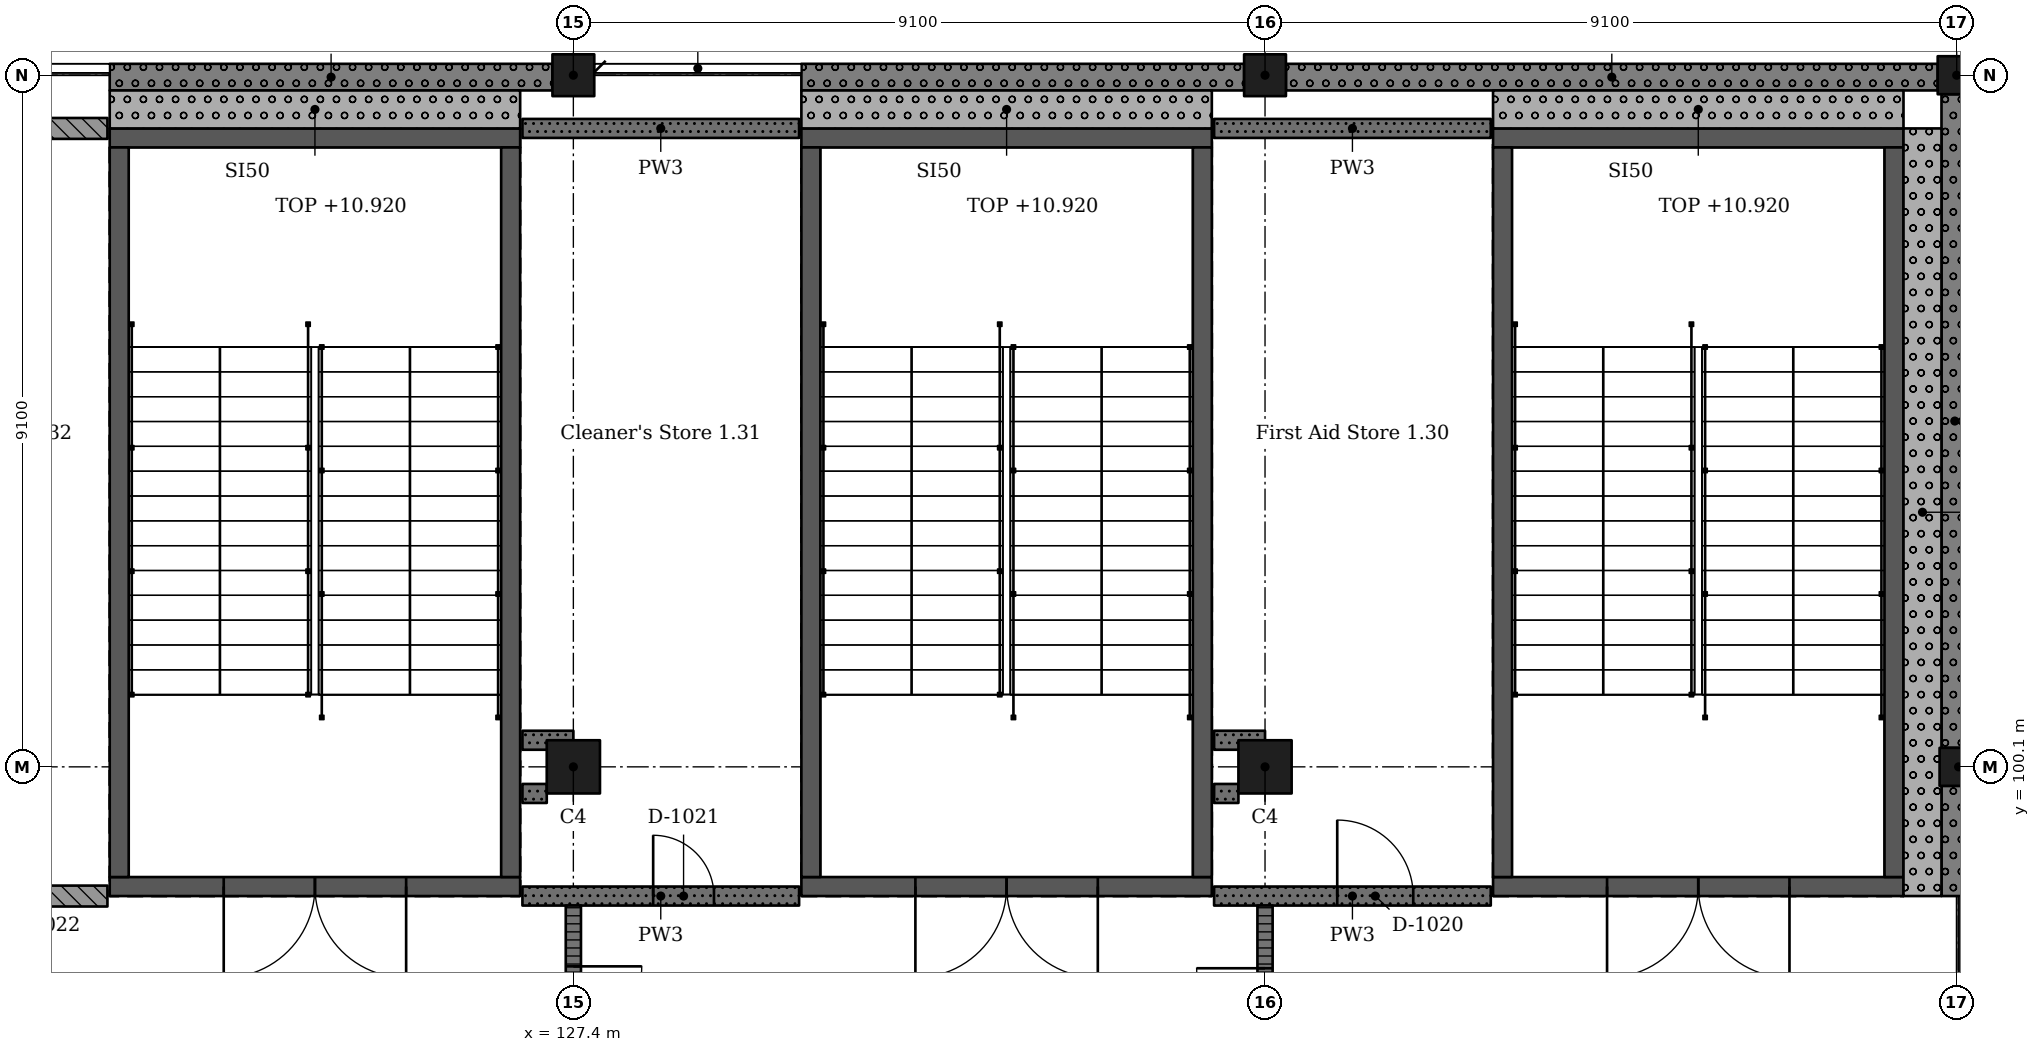
"""IFC4 building model, lengths in metres.
Left out: names, types, materials, properties, quantities, classifications, styles, units other than length and angle.
Written with IfcOpenShell. Run it as: python <this file> out.ifc"""

import sys

from ifc_helpers import new_model, si_unit, direction, frame, frame_2d, origin, origin_2d, place, context, subcontext, project, spatial, rectangle, extrude, element, fill, save


model = new_model("IFC4")
c1 = context("Model", 3, precision=1e-05, world=origin(), true_north=direction((0.0, 1.0)))
c2 = subcontext(c1, "Body", "Model", "MODEL_VIEW")
j1 = project(units=[si_unit("LENGTHUNIT", "METRE"), si_unit("PLANEANGLEUNIT", "RADIAN")], contexts=[c1])
p1 = place(None, origin())
s1 = spatial("IfcSite", under=j1, at=p1, CompositionType="ELEMENT")
p2 = place(p1, origin())
s2 = spatial("IfcBuilding", under=s1, at=p2, CompositionType="ELEMENT")
p3 = place(p2, frame((0.0, 0.0, 6.37)))
s3 = spatial("IfcBuildingStorey", under=s2, at=p3, CompositionType="ELEMENT", Elevation=6.37)
p4 = place(p3, frame((127.4, 100.1, 0.0), z_axis=(0.0, 0.0, 1.0), x_axis=(1.0, 0.0, 0.0)))
e1 = element("IfcColumn", 1, at=p4, inside=s3, PredefinedType="COLUMN", context=c2, shape_type="SweptSolid", body=[
    extrude(rectangle(XDim=0.7, YDim=0.7, at=origin_2d()), origin(), (0.0, 0.0, 1.0), 4.55),
])
p5 = place(p3, frame((127.4, 109.2, 0.0), z_axis=(0.0, 0.0, 1.0), x_axis=(1.0, 0.0, 0.0)))
e2 = element("IfcColumn", 2, at=p5, inside=s3, PredefinedType="COLUMN", context=c2, shape_type="SweptSolid", body=[
    extrude(rectangle(XDim=0.55, YDim=0.55, at=origin_2d()), origin(), (0.0, 0.0, 1.0), 4.55),
])
p6 = place(p3, frame((136.5, 100.1, 0.0), z_axis=(0.0, 0.0, 1.0), x_axis=(1.0, 0.0, 0.0)))
e3 = element("IfcColumn", 3, at=p6, inside=s3, PredefinedType="COLUMN", context=c2, shape_type="SweptSolid", body=[
    extrude(rectangle(XDim=0.7, YDim=0.7, at=origin_2d()), origin(), (0.0, 0.0, 1.0), 4.55),
])
p7 = place(p3, frame((136.5, 109.2, 0.0), z_axis=(0.0, 0.0, 1.0), x_axis=(1.0, 0.0, 0.0)))
e4 = element("IfcColumn", 4, at=p7, inside=s3, PredefinedType="COLUMN", context=c2, shape_type="SweptSolid", body=[
    extrude(rectangle(XDim=0.55, YDim=0.55, at=origin_2d()), origin(), (0.0, 0.0, 1.0), 4.55),
])
for number, where, z_axis, x_axis in (
    (5, (145.625, 100.1, 0.0), (0.0, 0.0, 1.0), (1.0, 0.0, 0.0)),
    (6, (145.6, 109.2, 0.0), (0.0, 0.0, 1.0), (1.0, 0.0, 0.0)),
):
    element("IfcColumn", number, at=place(p3, frame(where, z_axis=z_axis, x_axis=x_axis)), inside=s3, PredefinedType="COLUMN", context=c2, shape_type="SweptSolid", body=[
        extrude(rectangle(XDim=0.5, YDim=0.5, at=origin_2d()), origin(), (0.0, 0.0, 1.0), 4.55),
    ])
p8 = place(p3, frame((144.9, 98.525, 0.0), z_axis=(0.0, 0.0, 1.0), x_axis=(-1.0, 0.0, 0.0)))
e7 = element("IfcWall", 7, at=p8, inside=s3, PredefinedType="SHEAR", context=c2, shape_type="SweptSolid", body=[
    extrude(rectangle(XDim=5.4, YDim=0.25, at=frame_2d((2.7, 0.0))), origin(), (0.0, 0.0, 1.0), 4.55),
])
p9 = place(p8, frame((1.5, 0.0, 0.0)))
e8 = element("IfcOpeningElement", 8, at=p9, cuts=e7, PredefinedType="OPENING", context=c2, shape_type="SweptSolid", body=[
    extrude(rectangle(XDim=2.4, YDim=2.1, at=frame_2d((1.2, 1.05))), frame((0.0, 0.135, 0.0), z_axis=(0.0, -1.0, 0.0), x_axis=(1.0, 0.0, 0.0)), (0.0, 0.0, 1.0), 0.27),
])
p10 = place(p3, frame((144.9, 108.375, 0.0), z_axis=(0.0, 0.0, 1.0), x_axis=(-1.0, 0.0, 0.0)))
e9 = element("IfcWall", 9, at=p10, inside=s3, PredefinedType="SHEAR", context=c2, shape_type="SweptSolid", body=[
    extrude(rectangle(XDim=5.4, YDim=0.25, at=frame_2d((2.7, 0.0))), origin(), (0.0, 0.0, 1.0), 4.55),
])
for number, where, z_axis, x_axis in (
    (10, (139.625, 108.25, 0.0), (0.0, 0.0, 1.0), (0.0, -1.0, 0.0)),
    (11, (144.775, 108.25, 0.0), (0.0, 0.0, 1.0), (0.0, -1.0, 0.0)),
):
    element("IfcWall", number, at=place(p3, frame(where, z_axis=z_axis, x_axis=x_axis)), inside=s3, PredefinedType="SHEAR", context=c2, shape_type="SweptSolid", body=[
        extrude(rectangle(XDim=9.6, YDim=0.25, at=frame_2d((4.8, 0.0))), origin(), (0.0, 0.0, 1.0), 4.55),
    ])
p11 = place(p3, frame((135.8, 98.525, 0.0), z_axis=(0.0, 0.0, 1.0), x_axis=(-1.0, 0.0, 0.0)))
e12 = element("IfcWall", 12, at=p11, inside=s3, PredefinedType="SHEAR", context=c2, shape_type="SweptSolid", body=[
    extrude(rectangle(XDim=5.4, YDim=0.25, at=frame_2d((2.7, 0.0))), origin(), (0.0, 0.0, 1.0), 4.55),
])
p12 = place(p11, frame((1.5, 0.0, 0.0)))
e13 = element("IfcOpeningElement", 13, at=p12, cuts=e12, PredefinedType="OPENING", context=c2, shape_type="SweptSolid", body=[
    extrude(rectangle(XDim=2.4, YDim=2.1, at=frame_2d((1.2, 1.05))), frame((0.0, 0.135, 0.0), z_axis=(0.0, -1.0, 0.0), x_axis=(1.0, 0.0, 0.0)), (0.0, 0.0, 1.0), 0.27),
])
p13 = place(p3, frame((135.8, 108.375, 0.0), z_axis=(0.0, 0.0, 1.0), x_axis=(-1.0, 0.0, 0.0)))
e14 = element("IfcWall", 14, at=p13, inside=s3, PredefinedType="SHEAR", context=c2, shape_type="SweptSolid", body=[
    extrude(rectangle(XDim=5.4, YDim=0.25, at=frame_2d((2.7, 0.0))), origin(), (0.0, 0.0, 1.0), 4.55),
])
for number, where, z_axis, x_axis in (
    (15, (130.525, 108.25, 0.0), (0.0, 0.0, 1.0), (0.0, -1.0, 0.0)),
    (16, (135.675, 108.25, 0.0), (0.0, 0.0, 1.0), (0.0, -1.0, 0.0)),
):
    element("IfcWall", number, at=place(p3, frame(where, z_axis=z_axis, x_axis=x_axis)), inside=s3, PredefinedType="SHEAR", context=c2, shape_type="SweptSolid", body=[
        extrude(rectangle(XDim=9.6, YDim=0.25, at=frame_2d((4.8, 0.0))), origin(), (0.0, 0.0, 1.0), 4.55),
    ])
p14 = place(p3, frame((126.7, 98.525, 0.0), z_axis=(0.0, 0.0, 1.0), x_axis=(-1.0, 0.0, 0.0)))
e17 = element("IfcWall", 17, at=p14, inside=s3, PredefinedType="SHEAR", context=c2, shape_type="SweptSolid", body=[
    extrude(rectangle(XDim=5.4, YDim=0.25, at=frame_2d((2.7, 0.0))), origin(), (0.0, 0.0, 1.0), 4.55),
])
p15 = place(p14, frame((1.5, 0.0, 0.0)))
e18 = element("IfcOpeningElement", 18, at=p15, cuts=e17, PredefinedType="OPENING", context=c2, shape_type="SweptSolid", body=[
    extrude(rectangle(XDim=2.4, YDim=2.1, at=frame_2d((1.2, 1.05))), frame((0.0, 0.135, 0.0), z_axis=(0.0, -1.0, 0.0), x_axis=(1.0, 0.0, 0.0)), (0.0, 0.0, 1.0), 0.27),
])
p16 = place(p3, frame((126.7, 108.375, 0.0), z_axis=(0.0, 0.0, 1.0), x_axis=(-1.0, 0.0, 0.0)))
e19 = element("IfcWall", 19, at=p16, inside=s3, PredefinedType="SHEAR", context=c2, shape_type="SweptSolid", body=[
    extrude(rectangle(XDim=5.4, YDim=0.25, at=frame_2d((2.7, 0.0))), origin(), (0.0, 0.0, 1.0), 4.55),
])
for number, where, z_axis, x_axis in (
    (20, (121.425, 108.25, 0.0), (0.0, 0.0, 1.0), (0.0, -1.0, 0.0)),
    (21, (126.575, 108.25, 0.0), (0.0, 0.0, 1.0), (0.0, -1.0, 0.0)),
):
    element("IfcWall", number, at=place(p3, frame(where, z_axis=z_axis, x_axis=x_axis)), inside=s3, PredefinedType="SHEAR", context=c2, shape_type="SweptSolid", body=[
        extrude(rectangle(XDim=9.6, YDim=0.25, at=frame_2d((4.8, 0.0))), origin(), (0.0, 0.0, 1.0), 4.55),
    ])
p17 = place(p3, frame((145.575, 98.4, 0.0), z_axis=(0.0, 0.0, 1.0), x_axis=(0.0, 1.0, 0.0)))
e22 = element("IfcWall", 22, at=p17, inside=s3, PredefinedType="SOLIDWALL", context=c2, shape_type="SweptSolid", body=[
    extrude(rectangle(XDim=1.45, YDim=0.35, at=frame_2d((0.725, 0.0))), origin(), (0.0, 0.0, 1.0), 3.5),
])
p18 = place(p3, frame((145.575, 100.35, 0.0), z_axis=(0.0, 0.0, 1.0), x_axis=(0.0, 1.0, 0.0)))
e23 = element("IfcWall", 23, at=p18, inside=s3, PredefinedType="SOLIDWALL", context=c2, shape_type="SweptSolid", body=[
    extrude(rectangle(XDim=8.6, YDim=0.35, at=frame_2d((4.3, 0.0))), origin(), (0.0, 0.0, 1.0), 3.5),
])
p19 = place(p3, frame((145.35, 109.175, 0.0), z_axis=(0.0, 0.0, 1.0), x_axis=(-1.0, 0.0, 0.0)))
e24 = element("IfcWall", 24, at=p19, inside=s3, PredefinedType="SOLIDWALL", context=c2, shape_type="SweptSolid", body=[
    extrude(rectangle(XDim=8.575, YDim=0.35, at=frame_2d((4.288, 0.0))), origin(), (0.0, 0.0, 1.0), 3.5),
])
p20 = place(p3, frame((136.225, 109.175, 0.0), z_axis=(0.0, 0.0, 1.0), x_axis=(-1.0, 0.0, 0.0)))
e25 = element("IfcWall", 25, at=p20, inside=s3, PredefinedType="SOLIDWALL", context=c2, shape_type="SweptSolid", body=[
    extrude(rectangle(XDim=5.825, YDim=0.35, at=frame_2d((2.913, 0.0))), origin(), (0.0, 0.0, 1.0), 3.5),
])
p21 = place(p3, frame((127.125, 109.175, 0.0), z_axis=(0.0, 0.0, 1.0), x_axis=(-1.0, 0.0, 0.0)))
e26 = element("IfcWall", 26, at=p21, inside=s3, PredefinedType="SOLIDWALL", context=c2, shape_type="SweptSolid", body=[
    extrude(rectangle(XDim=5.825, YDim=0.35, at=frame_2d((2.913, 0.0))), origin(), (0.0, 0.0, 1.0), 3.5),
])
p22 = place(p3, frame((139.5, 108.75, 0.0), z_axis=(0.0, 0.0, 1.0), x_axis=(1.0, 0.0, 0.0)))
e27 = element("IfcWall", 27, at=p22, inside=s3, PredefinedType="SOLIDWALL", context=c2, shape_type="SweptSolid", body=[
    extrude(rectangle(XDim=5.4, YDim=0.5, at=frame_2d((2.7, 0.0))), origin(), (0.0, 0.0, 1.0), 4.55),
])
p23 = place(p3, frame((145.15, 98.4, 0.0), z_axis=(0.0, 0.0, 1.0), x_axis=(0.0, 1.0, 0.0)))
e28 = element("IfcWall", 28, at=p23, inside=s3, PredefinedType="SOLIDWALL", context=c2, shape_type="SweptSolid", body=[
    extrude(rectangle(XDim=10.1, YDim=0.5, at=frame_2d((5.05, 0.0))), origin(), (0.0, 0.0, 1.0), 4.55),
])
p24 = place(p3, frame((130.4, 108.75, 0.0), z_axis=(0.0, 0.0, 1.0), x_axis=(1.0, 0.0, 0.0)))
e29 = element("IfcWall", 29, at=p24, inside=s3, PredefinedType="SOLIDWALL", context=c2, shape_type="SweptSolid", body=[
    extrude(rectangle(XDim=5.4, YDim=0.5, at=frame_2d((2.7, 0.0))), origin(), (0.0, 0.0, 1.0), 4.55),
])
p25 = place(p3, frame((121.3, 108.75, 0.0), z_axis=(0.0, 0.0, 1.0), x_axis=(1.0, 0.0, 0.0)))
e30 = element("IfcWall", 30, at=p25, inside=s3, PredefinedType="SOLIDWALL", context=c2, shape_type="SweptSolid", body=[
    extrude(rectangle(XDim=5.4, YDim=0.5, at=frame_2d((2.7, 0.0))), origin(), (0.0, 0.0, 1.0), 4.55),
])
p26 = place(p3, frame((117.63, 98.4, 0.0), z_axis=(0.0, 0.0, 1.0), x_axis=(1.0, 0.0, 0.0)))
e31 = element("IfcWall", 31, at=p26, inside=s3, PredefinedType="SOLIDWALL", context=c2, shape_type="SweptSolid", body=[
    extrude(rectangle(XDim=3.64, YDim=0.275, at=frame_2d((1.82, 0.0))), origin(), (0.0, 0.0, 1.0), 4.25),
])
p27 = place(p26, frame((1.52, 0.0, 0.0)))
e32 = element("IfcOpeningElement", 32, at=p27, cuts=e31, PredefinedType="OPENING", context=c2, shape_type="SweptSolid", body=[
    extrude(rectangle(XDim=1.2, YDim=2.4, at=frame_2d((0.6, 1.2))), frame((0.0, 0.147, 0.0), z_axis=(0.0, -1.0, 0.0), x_axis=(1.0, 0.0, 0.0)), (0.0, 0.0, 1.0), 0.295),
])
p28 = place(p3, frame((117.63, 108.5, 0.0), z_axis=(0.0, 0.0, 1.0), x_axis=(1.0, 0.0, 0.0)))
e33 = element("IfcWall", 33, at=p28, inside=s3, PredefinedType="SOLIDWALL", context=c2, shape_type="SweptSolid", body=[
    extrude(rectangle(XDim=3.64, YDim=0.275, at=frame_2d((1.82, 0.0))), origin(), (0.0, 0.0, 1.0), 4.25),
])
p29 = place(p3, frame((126.73, 98.4, 0.0), z_axis=(0.0, 0.0, 1.0), x_axis=(1.0, 0.0, 0.0)))
e34 = element("IfcWall", 34, at=p29, inside=s3, PredefinedType="SOLIDWALL", context=c2, shape_type="SweptSolid", body=[
    extrude(rectangle(XDim=3.64, YDim=0.25, at=frame_2d((1.82, 0.0))), origin(), (0.0, 0.0, 1.0), 4.25),
])
p30 = place(p29, frame((1.72, 0.0, 0.0)))
e35 = element("IfcOpeningElement", 35, at=p30, cuts=e34, PredefinedType="OPENING", context=c2, shape_type="SweptSolid", body=[
    extrude(rectangle(XDim=0.8, YDim=2.1, at=frame_2d((0.4, 1.05))), frame((0.0, 0.135, 0.0), z_axis=(0.0, -1.0, 0.0), x_axis=(1.0, 0.0, 0.0)), (0.0, 0.0, 1.0), 0.27),
])
p31 = place(p3, frame((126.73, 99.75, 0.0), z_axis=(0.0, 0.0, 1.0), x_axis=(1.0, 0.0, 0.0)))
e36 = element("IfcWall", 36, at=p31, inside=s3, PredefinedType="SOLIDWALL", context=c2, shape_type="SweptSolid", body=[
    extrude(rectangle(XDim=0.32, YDim=0.25, at=frame_2d((0.16, 0.0))), origin(), (0.0, 0.0, 1.0), 4.25),
])
p32 = place(p3, frame((126.73, 100.45, 0.0), z_axis=(0.0, 0.0, 1.0), x_axis=(1.0, 0.0, 0.0)))
e37 = element("IfcWall", 37, at=p32, inside=s3, PredefinedType="SOLIDWALL", context=c2, shape_type="SweptSolid", body=[
    extrude(rectangle(XDim=0.67, YDim=0.25, at=frame_2d((0.335, 0.0))), origin(), (0.0, 0.0, 1.0), 4.25),
])
p33 = place(p3, frame((126.73, 108.5, 0.0), z_axis=(0.0, 0.0, 1.0), x_axis=(1.0, 0.0, 0.0)))
e38 = element("IfcWall", 38, at=p33, inside=s3, PredefinedType="SOLIDWALL", context=c2, shape_type="SweptSolid", body=[
    extrude(rectangle(XDim=3.64, YDim=0.25, at=frame_2d((1.82, 0.0))), origin(), (0.0, 0.0, 1.0), 4.25),
])
p34 = place(p3, frame((127.4, 91.425, 0.0), z_axis=(0.0, 0.0, 1.0), x_axis=(0.0, 1.0, 0.0)))
e39 = element("IfcWall", 39, at=p34, inside=s3, PredefinedType="PARTITIONING", context=c2, shape_type="SweptSolid", body=[
    extrude(rectangle(XDim=6.85, YDim=0.2, at=frame_2d((3.425, 0.0))), origin(), (0.0, 0.0, 1.0), 3.55),
])
p35 = place(p34, frame((0.85, 0.0, 0.0)))
e40 = element("IfcOpeningElement", 40, at=p35, cuts=e39, PredefinedType="OPENING", context=c2, shape_type="SweptSolid", body=[
    extrude(rectangle(XDim=1.8, YDim=2.4, at=frame_2d((0.9, 1.2))), frame((0.0, 0.11, 0.0), z_axis=(0.0, -1.0, 0.0), x_axis=(1.0, 0.0, 0.0)), (0.0, 0.0, 1.0), 0.22),
])
p36 = place(p34, frame((4.25, 0.0, 0.0)))
e41 = element("IfcOpeningElement", 41, at=p36, cuts=e39, PredefinedType="OPENING", context=c2, shape_type="SweptSolid", body=[
    extrude(rectangle(XDim=1.8, YDim=2.4, at=frame_2d((0.9, 1.2))), frame((0.0, 0.11, 0.0), z_axis=(0.0, -1.0, 0.0), x_axis=(1.0, 0.0, 0.0)), (0.0, 0.0, 1.0), 0.22),
])
p37 = place(p3, frame((135.83, 98.4, 0.0), z_axis=(0.0, 0.0, 1.0), x_axis=(1.0, 0.0, 0.0)))
e42 = element("IfcWall", 42, at=p37, inside=s3, PredefinedType="SOLIDWALL", context=c2, shape_type="SweptSolid", body=[
    extrude(rectangle(XDim=3.64, YDim=0.25, at=frame_2d((1.82, 0.0))), origin(), (0.0, 0.0, 1.0), 4.25),
])
p38 = place(p37, frame((1.62, 0.0, 0.0)))
e43 = element("IfcOpeningElement", 43, at=p38, cuts=e42, PredefinedType="OPENING", context=c2, shape_type="SweptSolid", body=[
    extrude(rectangle(XDim=1.0, YDim=2.1, at=frame_2d((0.5, 1.05))), frame((0.0, 0.135, 0.0), z_axis=(0.0, -1.0, 0.0), x_axis=(1.0, 0.0, 0.0)), (0.0, 0.0, 1.0), 0.27),
])
p39 = place(p3, frame((135.83, 99.75, 0.0), z_axis=(0.0, 0.0, 1.0), x_axis=(1.0, 0.0, 0.0)))
e44 = element("IfcWall", 44, at=p39, inside=s3, PredefinedType="SOLIDWALL", context=c2, shape_type="SweptSolid", body=[
    extrude(rectangle(XDim=0.32, YDim=0.25, at=frame_2d((0.16, 0.0))), origin(), (0.0, 0.0, 1.0), 4.25),
])
p40 = place(p3, frame((135.83, 100.45, 0.0), z_axis=(0.0, 0.0, 1.0), x_axis=(1.0, 0.0, 0.0)))
e45 = element("IfcWall", 45, at=p40, inside=s3, PredefinedType="SOLIDWALL", context=c2, shape_type="SweptSolid", body=[
    extrude(rectangle(XDim=0.67, YDim=0.25, at=frame_2d((0.335, 0.0))), origin(), (0.0, 0.0, 1.0), 4.25),
])
p41 = place(p3, frame((135.83, 108.5, 0.0), z_axis=(0.0, 0.0, 1.0), x_axis=(1.0, 0.0, 0.0)))
e46 = element("IfcWall", 46, at=p41, inside=s3, PredefinedType="SOLIDWALL", context=c2, shape_type="SweptSolid", body=[
    extrude(rectangle(XDim=3.64, YDim=0.25, at=frame_2d((1.82, 0.0))), origin(), (0.0, 0.0, 1.0), 4.25),
])
p42 = place(p3, frame((136.5, 91.4, 0.0), z_axis=(0.0, 0.0, 1.0), x_axis=(0.0, 1.0, 0.0)))
e47 = element("IfcWall", 47, at=p42, inside=s3, PredefinedType="PARTITIONING", context=c2, shape_type="SweptSolid", body=[
    extrude(rectangle(XDim=6.875, YDim=0.2, at=frame_2d((3.438, 0.0))), origin(), (0.0, 0.0, 1.0), 3.55),
])
p43 = place(p42, frame((0.85, 0.0, 0.0)))
e48 = element("IfcOpeningElement", 48, at=p43, cuts=e47, PredefinedType="OPENING", context=c2, shape_type="SweptSolid", body=[
    extrude(rectangle(XDim=1.8, YDim=2.4, at=frame_2d((0.9, 1.2))), frame((0.0, 0.11, 0.0), z_axis=(0.0, -1.0, 0.0), x_axis=(1.0, 0.0, 0.0)), (0.0, 0.0, 1.0), 0.22),
])
p44 = place(p42, frame((4.25, 0.0, 0.0)))
e49 = element("IfcOpeningElement", 49, at=p44, cuts=e47, PredefinedType="OPENING", context=c2, shape_type="SweptSolid", body=[
    extrude(rectangle(XDim=1.8, YDim=2.4, at=frame_2d((0.9, 1.2))), frame((0.0, 0.11, 0.0), z_axis=(0.0, -1.0, 0.0), x_axis=(1.0, 0.0, 0.0)), (0.0, 0.0, 1.0), 0.22),
])
p45 = place(p38, origin())
e50 = element("IfcDoor", 50, at=p45, inside=s3, OperationType="SINGLE_SWING_RIGHT", PredefinedType="DOOR", context=c2, shape_type="SweptSolid", body=[
    extrude(rectangle(XDim=1.0, YDim=2.1, at=frame_2d((0.5, 1.05))), frame((0.0, 0.025, 0.0), z_axis=(0.0, -1.0, 0.0), x_axis=(1.0, 0.0, 0.0)), (0.0, 0.0, 1.0), 0.05),
])
fill(e43, e50)
p46 = place(p30, origin())
e51 = element("IfcDoor", 51, at=p46, inside=s3, OperationType="SINGLE_SWING_RIGHT", PredefinedType="DOOR", context=c2, shape_type="SweptSolid", body=[
    extrude(rectangle(XDim=0.8, YDim=2.1, at=frame_2d((0.4, 1.05))), frame((0.0, 0.025, 0.0), z_axis=(0.0, -1.0, 0.0), x_axis=(1.0, 0.0, 0.0)), (0.0, 0.0, 1.0), 0.05),
])
fill(e35, e51)
p47 = place(p44, origin())
e52 = element("IfcDoor", 52, at=p47, inside=s3, OperationType="DOUBLE_DOOR_SINGLE_SWING", PredefinedType="DOOR", context=c2, shape_type="SweptSolid", body=[
    extrude(rectangle(XDim=1.8, YDim=2.4, at=frame_2d((0.9, 1.2))), frame((0.0, 0.025, 0.0), z_axis=(0.0, -1.0, 0.0), x_axis=(1.0, 0.0, 0.0)), (0.0, 0.0, 1.0), 0.05),
])
fill(e49, e52)
p48 = place(p36, origin())
e53 = element("IfcDoor", 53, at=p48, inside=s3, OperationType="DOUBLE_DOOR_SINGLE_SWING", PredefinedType="DOOR", context=c2, shape_type="SweptSolid", body=[
    extrude(rectangle(XDim=1.8, YDim=2.4, at=frame_2d((0.9, 1.2))), frame((0.0, 0.025, 0.0), z_axis=(0.0, -1.0, 0.0), x_axis=(1.0, 0.0, 0.0)), (0.0, 0.0, 1.0), 0.05),
])
fill(e41, e53)
p49 = place(p9, origin())
e54 = element("IfcDoor", 54, at=p49, inside=s3, OperationType="DOUBLE_DOOR_SINGLE_SWING", PredefinedType="DOOR", context=c2, shape_type="SweptSolid", body=[
    extrude(rectangle(XDim=2.4, YDim=2.1, at=frame_2d((1.2, 1.05))), frame((0.0, 0.025, 0.0), z_axis=(0.0, -1.0, 0.0), x_axis=(1.0, 0.0, 0.0)), (0.0, 0.0, 1.0), 0.05),
])
fill(e8, e54)
p50 = place(p12, origin())
e55 = element("IfcDoor", 55, at=p50, inside=s3, OperationType="DOUBLE_DOOR_SINGLE_SWING", PredefinedType="DOOR", context=c2, shape_type="SweptSolid", body=[
    extrude(rectangle(XDim=2.4, YDim=2.1, at=frame_2d((1.2, 1.05))), frame((0.0, 0.025, 0.0), z_axis=(0.0, -1.0, 0.0), x_axis=(1.0, 0.0, 0.0)), (0.0, 0.0, 1.0), 0.05),
])
fill(e13, e55)
p51 = place(p15, origin())
e56 = element("IfcDoor", 56, at=p51, inside=s3, OperationType="DOUBLE_DOOR_SINGLE_SWING", PredefinedType="DOOR", context=c2, shape_type="SweptSolid", body=[
    extrude(rectangle(XDim=2.4, YDim=2.1, at=frame_2d((1.2, 1.05))), frame((0.0, 0.025, 0.0), z_axis=(0.0, -1.0, 0.0), x_axis=(1.0, 0.0, 0.0)), (0.0, 0.0, 1.0), 0.05),
])
fill(e18, e56)
save(model, sys.argv[1])
